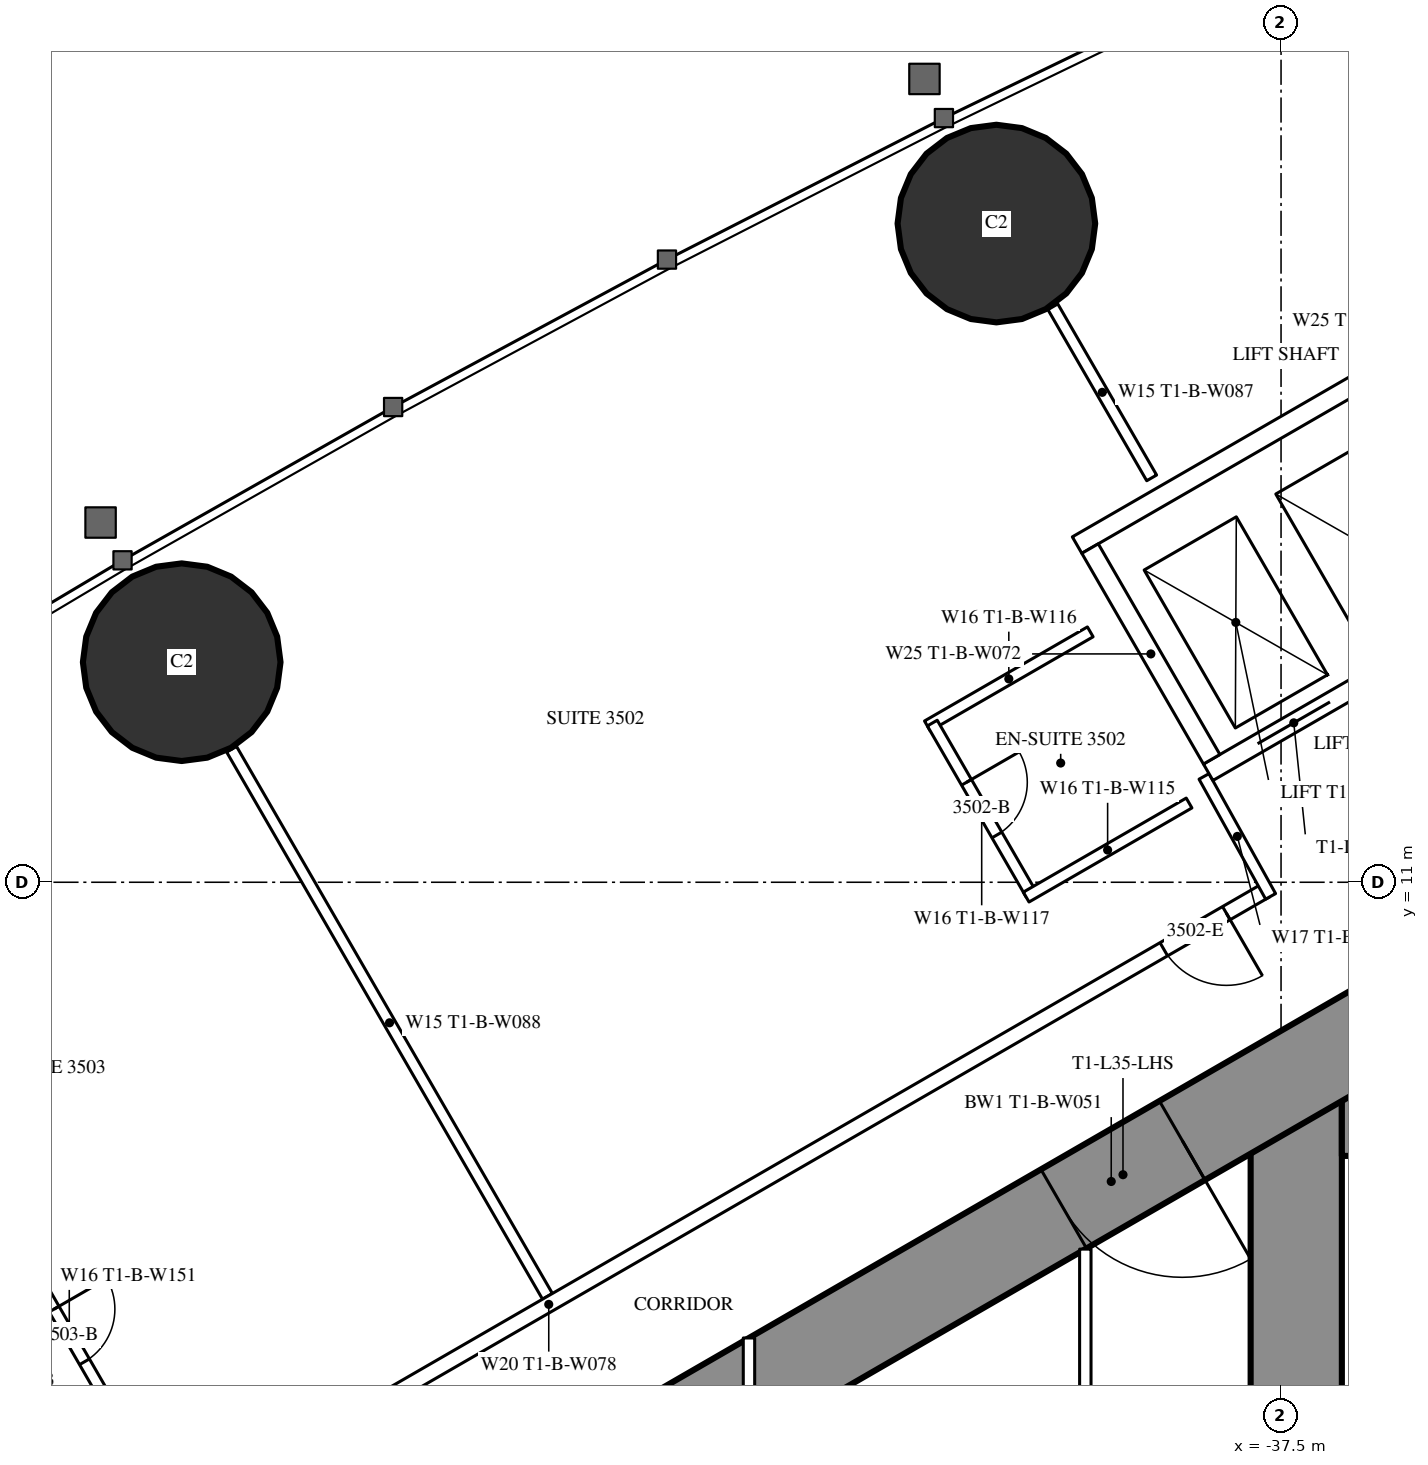
"""IFC4 building model, lengths in metres.
Left out: names, types, materials, properties, quantities, classifications, styles, units other than length and angle.
Written with IfcOpenShell. Run it as: python <this file> out.ifc"""

import sys

from ifc_helpers import new_model, si_unit, direction, frame, frame_2d, origin, origin_2d, place, context, subcontext, project, spatial, rectangle, hollow_circle, extrude, element, fill, save


model = new_model("IFC4")
c1 = context("Model", 3, precision=1e-05, world=origin(), true_north=direction((0.0, 1.0)))
c2 = subcontext(c1, "Body", "Model", "MODEL_VIEW")
j1 = project(units=[si_unit("LENGTHUNIT", "METRE"), si_unit("PLANEANGLEUNIT", "RADIAN")], contexts=[c1])
p1 = place(None, origin())
s1 = spatial("IfcSite", under=j1, at=p1, CompositionType="ELEMENT")
p2 = place(p1, origin())
s2 = spatial("IfcBuilding", under=s1, at=p2, CompositionType="ELEMENT")
p3 = place(p2, frame((0.0, 0.0, 132.6)))
s3 = spatial("IfcBuildingStorey", under=s2, at=p3, CompositionType="ELEMENT", Elevation=132.6)
for number, where, z_axis, x_axis in (
    (1, (-41.245, 19.666, 0.0), (0.0, 0.0, 1.0), (1.0, 0.0, 0.0)),
    (2, (-51.963, 13.895, 0.0), (0.0, 0.0, 1.0), (1.0, 0.0, 0.0)),
):
    element("IfcColumn", number, at=place(p3, frame(where, z_axis=z_axis, x_axis=x_axis)), inside=s3, PredefinedType="COLUMN", context=c2, shape_type="SweptSolid", body=[
        extrude(hollow_circle(Radius=1.3, WallThickness=0.1, at=origin_2d()), origin(), (0.0, 0.0, 1.0), 3.5),
    ])
p4 = place(p3, frame((-37.3, 8.6, 0.0), z_axis=(0.0, 0.0, 1.0), x_axis=(0.0, -1.0, 0.0)))
e3 = element("IfcWall", 3, at=p4, inside=s3, PredefinedType="SHEAR", context=c2, shape_type="SweptSolid", body=[
    extrude(rectangle(XDim=17.2, YDim=1.2, at=frame_2d((8.6, 0.0))), origin(), (0.0, 0.0, 1.0), 3.5),
])
p5 = place(p4, frame((7.7, 0.0, 0.0)))
e4 = element("IfcOpeningElement", 4, at=p5, cuts=e3, PredefinedType="OPENING", context=c2, shape_type="SweptSolid", body=[
    extrude(rectangle(XDim=1.8, YDim=2.2, at=frame_2d((0.9, 1.1))), frame((0.0, 0.61, 0.0), z_axis=(0.0, -1.0, 0.0), x_axis=(1.0, 0.0, 0.0)), (0.0, 0.0, 1.0), 1.22),
])
p6 = place(p3, frame((-28.3, 8.0, 0.0), z_axis=(0.0, 0.0, 1.0), x_axis=(-1.0, 0.0, 0.0)))
e5 = element("IfcWall", 5, at=p6, inside=s3, PredefinedType="SHEAR", context=c2, shape_type="SweptSolid", body=[
    extrude(rectangle(XDim=8.4, YDim=1.2, at=frame_2d((4.2, 0.0))), origin(), (0.0, 0.0, 1.0), 3.5),
])
p7 = place(p6, frame((0.25, 0.0, 0.0)))
e6 = element("IfcOpeningElement", 6, at=p7, cuts=e5, PredefinedType="OPENING", context=c2, shape_type="SweptSolid", body=[
    extrude(rectangle(XDim=1.0, YDim=2.2, at=frame_2d((0.5, 1.1))), frame((0.0, 0.61, 0.0), z_axis=(0.0, -1.0, 0.0), x_axis=(1.0, 0.0, 0.0)), (0.0, 0.0, 1.0), 1.22),
])
p8 = place(p3, frame((-27.2, 14.3, 0.0), z_axis=(0.0, 0.0, 1.0), x_axis=(-0.866026593062, -0.499997940104, 0.0)))
e7 = element("IfcWall", 7, at=p8, inside=s3, PredefinedType="SHEAR", context=c2, shape_type="SweptSolid", body=[
    extrude(rectangle(XDim=28.946, YDim=1.2, at=frame_2d((14.473, 0.0))), origin(), (0.0, 0.0, 1.0), 3.5),
])
p9 = place(p8, frame((4.6, 0.0, 0.0)))
e8 = element("IfcOpeningElement", 8, at=p9, cuts=e7, PredefinedType="OPENING", context=c2, shape_type="SweptSolid", body=[
    extrude(rectangle(XDim=1.0, YDim=2.2, at=frame_2d((0.5, 1.1))), frame((0.0, 0.61, 0.0), z_axis=(0.0, -1.0, 0.0), x_axis=(1.0, 0.0, 0.0)), (0.0, 0.0, 1.0), 1.22),
])
p10 = place(p8, frame((13.395, 0.0, 0.0)))
e9 = element("IfcOpeningElement", 9, at=p10, cuts=e7, PredefinedType="OPENING", context=c2, shape_type="SweptSolid", body=[
    extrude(rectangle(XDim=1.8, YDim=2.2, at=frame_2d((0.9, 1.1))), frame((0.0, 0.61, 0.0), z_axis=(0.0, -1.0, 0.0), x_axis=(1.0, 0.0, 0.0)), (0.0, 0.0, 1.0), 1.22),
])
p11 = place(p3, frame((-47.151, 5.552, 0.0), z_axis=(0.0, 0.0, 1.0), x_axis=(-0.500003012045, 0.866023664773, 0.0)))
e10 = element("IfcWall", 10, at=p11, inside=s3, PredefinedType="PARTITIONING", context=c2, shape_type="SweptSolid", body=[
    extrude(rectangle(XDim=8.311, YDim=0.15, at=frame_2d((4.156, 0.0))), origin(), (0.0, 0.0, 1.0), 2.2),
])
p12 = place(p3, frame((-39.202, 16.32, 0.0), z_axis=(0.0, 0.0, 1.0), x_axis=(-0.499947391036, 0.866055775454, 0.0)))
e11 = element("IfcWall", 11, at=p12, inside=s3, PredefinedType="PARTITIONING", context=c2, shape_type="SweptSolid", body=[
    extrude(rectangle(XDim=2.599, YDim=0.15, at=frame_2d((1.3, 0.0))), origin(), (0.0, 0.0, 1.0), 3.25),
])
p13 = place(p3, frame((-37.7, 10.894, 0.0), z_axis=(0.0, 0.0, 1.0), x_axis=(-0.866027905338, -0.499995667157, 0.0)))
e12 = element("IfcWall", 12, at=p13, inside=s3, PredefinedType="PARTITIONING", context=c2, shape_type="SweptSolid", body=[
    extrude(rectangle(XDim=21.787, YDim=0.2, at=frame_2d((10.894, 0.0))), origin(), (0.0, 0.0, 1.0), 3.25),
])
p14 = place(p13, frame((17.711, 0.0, 0.0)))
e13 = element("IfcOpeningElement", 13, at=p14, cuts=e12, PredefinedType="OPENING", context=c2, shape_type="SweptSolid", body=[
    extrude(rectangle(XDim=0.95, YDim=2.2, at=frame_2d((0.475, 1.1))), frame((0.0, 0.11, 0.0), z_axis=(0.0, -1.0, 0.0), x_axis=(1.0, 0.0, 0.0)), (0.0, 0.0, 1.0), 0.22),
])
p15 = place(p13, frame((19.399, 0.0, 0.0)))
e14 = element("IfcOpeningElement", 14, at=p15, cuts=e12, PredefinedType="OPENING", context=c2, shape_type="SweptSolid", body=[
    extrude(rectangle(XDim=1.8, YDim=2.2, at=frame_2d((0.9, 1.1))), frame((0.0, 0.11, 0.0), z_axis=(0.0, -1.0, 0.0), x_axis=(1.0, 0.0, 0.0)), (0.0, 0.0, 1.0), 0.22),
])
p16 = place(p13, frame((0.6, 0.0, 0.0)))
e15 = element("IfcOpeningElement", 15, at=p16, cuts=e12, PredefinedType="OPENING", context=c2, shape_type="SweptSolid", body=[
    extrude(rectangle(XDim=0.95, YDim=2.2, at=frame_2d((0.475, 1.1))), frame((0.0, 0.11, 0.0), z_axis=(0.0, -1.0, 0.0), x_axis=(1.0, 0.0, 0.0)), (0.0, 0.0, 1.0), 0.22),
])
p17 = place(p3, frame((-38.513, 12.392, 0.0), z_axis=(0.0, 0.0, 1.0), x_axis=(0.485585508183, -0.874189175317, 0.0)))
e16 = element("IfcWall", 16, at=p17, inside=s3, PredefinedType="PARTITIONING", context=c2, shape_type="SweptSolid", body=[
    extrude(rectangle(XDim=1.805, YDim=0.15, at=frame_2d((0.902, 0.0))), origin(), (0.0, 0.0, 1.0), 3.25),
])
p18 = place(p3, frame((-52.792, 3.912, 0.0), z_axis=(0.0, 0.0, 1.0), x_axis=(-0.500006934395, 0.866021400173, 0.0)))
e17 = element("IfcWall", 17, at=p18, inside=s3, PredefinedType="PARTITIONING", context=c2, shape_type="SweptSolid", body=[
    extrude(rectangle(XDim=2.6, YDim=0.15, at=frame_2d((1.3, 0.0))), origin(), (0.0, 0.0, 1.0), 3.25),
])
p19 = place(p18, frame((0.9, 0.0, 0.0)))
e18 = element("IfcOpeningElement", 18, at=p19, cuts=e17, PredefinedType="OPENING", context=c2, shape_type="SweptSolid", body=[
    extrude(rectangle(XDim=0.8, YDim=2.2, at=frame_2d((0.4, 1.1))), frame((0.0, 0.085, 0.0), z_axis=(0.0, -1.0, 0.0), x_axis=(1.0, 0.0, 0.0)), (0.0, 0.0, 1.0), 0.17),
])
p20 = place(p3, frame((-40.01, 14.294, 0.0), z_axis=(0.0, 0.0, 1.0), x_axis=(-0.866031185235, -0.4999899861, 0.0)))
e19 = element("IfcWall", 19, at=p20, inside=s3, PredefinedType="PARTITIONING", context=c2, shape_type="SweptSolid", body=[
    extrude(rectangle(XDim=2.475, YDim=0.15, at=frame_2d((1.238, 0.0))), origin(), (0.0, 0.0, 1.0), 3.25),
])
p21 = place(p3, frame((-40.788, 10.843, 0.0), z_axis=(0.0, 0.0, 1.0), x_axis=(-0.500006934395, 0.866021400173, 0.0)))
e20 = element("IfcWall", 20, at=p21, inside=s3, PredefinedType="PARTITIONING", context=c2, shape_type="SweptSolid", body=[
    extrude(rectangle(XDim=2.6, YDim=0.15, at=frame_2d((1.3, 0.0))), origin(), (0.0, 0.0, 1.0), 3.25),
])
p22 = place(p21, frame((0.9, 0.0, 0.0)))
e21 = element("IfcOpeningElement", 21, at=p22, cuts=e20, PredefinedType="OPENING", context=c2, shape_type="SweptSolid", body=[
    extrude(rectangle(XDim=0.8, YDim=2.2, at=frame_2d((0.4, 1.1))), frame((0.0, 0.085, 0.0), z_axis=(0.0, -1.0, 0.0), x_axis=(1.0, 0.0, 0.0)), (0.0, 0.0, 1.0), 0.17),
])
p23 = place(p3, frame((-38.71, 12.042, 0.0), z_axis=(0.0, 0.0, 1.0), x_axis=(-0.86604923931, -0.499958713387, 0.0)))
e22 = element("IfcWall", 22, at=p23, inside=s3, PredefinedType="PARTITIONING", context=c2, shape_type="SweptSolid", body=[
    extrude(rectangle(XDim=2.475, YDim=0.15, at=frame_2d((1.237, 0.0))), origin(), (0.0, 0.0, 1.0), 3.25),
])
p24 = place(p3, frame((-40.075, 6.174, 0.0), z_axis=(0.0, 0.0, 1.0), x_axis=(0.0, -1.0, 0.0)))
e23 = element("IfcWall", 23, at=p24, inside=s3, PredefinedType="PARTITIONING", context=c2, shape_type="SweptSolid", body=[
    extrude(rectangle(XDim=7.374, YDim=0.15, at=frame_2d((3.687, 0.0))), origin(), (0.0, 0.0, 1.0), 3.25),
])
p25 = place(p24, frame((2.787, 0.0, 0.0)))
e24 = element("IfcOpeningElement", 24, at=p25, cuts=e23, PredefinedType="OPENING", context=c2, shape_type="SweptSolid", body=[
    extrude(rectangle(XDim=1.8, YDim=2.2, at=frame_2d((0.9, 1.1))), frame((0.0, 0.085, 0.0), z_axis=(0.0, -1.0, 0.0), x_axis=(1.0, 0.0, 0.0)), (0.0, 0.0, 1.0), 0.17),
])
p26 = place(p3, frame((-44.5, 5.005, 0.0), z_axis=(0.0, 0.0, 1.0), x_axis=(0.0, -1.0, 0.0)))
e25 = element("IfcWall", 25, at=p26, inside=s3, PredefinedType="PARTITIONING", context=c2, shape_type="SweptSolid", body=[
    extrude(rectangle(XDim=10.009, YDim=0.15, at=frame_2d((5.005, 0.0))), origin(), (0.0, 0.0, 1.0), 2.45),
])
p27 = place(p26, frame((4.505, 0.0, 0.0)))
e26 = element("IfcOpeningElement", 26, at=p27, cuts=e25, PredefinedType="OPENING", context=c2, shape_type="SweptSolid", body=[
    extrude(rectangle(XDim=1.0, YDim=2.2, at=frame_2d((0.5, 1.1))), frame((0.0, 0.085, 0.0), z_axis=(0.0, -1.0, 0.0), x_axis=(1.0, 0.0, 0.0)), (0.0, 0.0, 1.0), 0.17),
])
p28 = place(p3, frame((-31.01, 16.747, 0.0), z_axis=(0.0, 0.0, 1.0), x_axis=(-0.866028165386, -0.499995216735, 0.0)))
e27 = element("IfcWall", 27, at=p28, inside=s3, PredefinedType="PARTITIONING", context=c2, shape_type="SweptSolid", body=[
    extrude(rectangle(XDim=8.6, YDim=0.25, at=frame_2d((4.3, 0.0))), origin(), (0.0, 0.0, 1.0), 3.25),
])
p29 = place(p28, frame((0.75, 0.0, 0.0)))
e28 = element("IfcOpeningElement", 28, at=p29, cuts=e27, PredefinedType="OPENING", context=c2, shape_type="SweptSolid", body=[
    extrude(rectangle(XDim=1.1, YDim=2.2, at=frame_2d((0.55, 1.1))), frame((0.0, 0.135, 0.0), z_axis=(0.0, -1.0, 0.0), x_axis=(1.0, 0.0, 0.0)), (0.0, 0.0, 1.0), 0.27),
])
p30 = place(p28, frame((2.75, 0.0, 0.0)))
e29 = element("IfcOpeningElement", 29, at=p30, cuts=e27, PredefinedType="OPENING", context=c2, shape_type="SweptSolid", body=[
    extrude(rectangle(XDim=1.1, YDim=2.2, at=frame_2d((0.55, 1.1))), frame((0.0, 0.135, 0.0), z_axis=(0.0, -1.0, 0.0), x_axis=(1.0, 0.0, 0.0)), (0.0, 0.0, 1.0), 0.27),
])
p31 = place(p28, frame((4.75, 0.0, 0.0)))
e30 = element("IfcOpeningElement", 30, at=p31, cuts=e27, PredefinedType="OPENING", context=c2, shape_type="SweptSolid", body=[
    extrude(rectangle(XDim=1.1, YDim=2.2, at=frame_2d((0.55, 1.1))), frame((0.0, 0.135, 0.0), z_axis=(0.0, -1.0, 0.0), x_axis=(1.0, 0.0, 0.0)), (0.0, 0.0, 1.0), 0.27),
])
p32 = place(p28, frame((6.75, 0.0, 0.0)))
e31 = element("IfcOpeningElement", 31, at=p32, cuts=e27, PredefinedType="OPENING", context=c2, shape_type="SweptSolid", body=[
    extrude(rectangle(XDim=1.1, YDim=2.2, at=frame_2d((0.55, 1.1))), frame((0.0, 0.135, 0.0), z_axis=(0.0, -1.0, 0.0), x_axis=(1.0, 0.0, 0.0)), (0.0, 0.0, 1.0), 0.27),
])
p33 = place(p3, frame((-32.736, 19.736, 0.0), z_axis=(0.0, 0.0, 1.0), x_axis=(-0.866028165386, -0.499995216735, 0.0)))
e32 = element("IfcWall", 32, at=p33, inside=s3, PredefinedType="PARTITIONING", context=c2, shape_type="SweptSolid", body=[
    extrude(rectangle(XDim=8.6, YDim=0.25, at=frame_2d((4.3, 0.0))), origin(), (0.0, 0.0, 1.0), 3.25),
])
p34 = place(p3, frame((-38.413, 12.618, 0.0), z_axis=(0.0, 0.0, 1.0), x_axis=(-0.499872130319, 0.866099216793, 0.0)))
e33 = element("IfcWall", 33, at=p34, inside=s3, PredefinedType="PARTITIONING", context=c2, shape_type="SweptSolid", body=[
    extrude(rectangle(XDim=3.2, YDim=0.25, at=frame_2d((1.6, 0.0))), origin(), (0.0, 0.0, 1.0), 3.25),
])
p35 = place(p19, origin())
e34 = element("IfcDoor", 34, at=p35, inside=s3, OperationType="SINGLE_SWING_RIGHT", PredefinedType="DOOR", context=c2, shape_type="SweptSolid", body=[
    extrude(rectangle(XDim=0.8, YDim=2.2, at=frame_2d((0.4, 1.1))), frame((0.0, 0.025, 0.0), z_axis=(0.0, -1.0, 0.0), x_axis=(1.0, 0.0, 0.0)), (0.0, 0.0, 1.0), 0.05),
])
fill(e18, e34)
p36 = place(p22, origin())
e35 = element("IfcDoor", 35, at=p36, inside=s3, OperationType="SINGLE_SWING_RIGHT", PredefinedType="DOOR", context=c2, shape_type="SweptSolid", body=[
    extrude(rectangle(XDim=0.8, YDim=2.2, at=frame_2d((0.4, 1.1))), frame((0.0, 0.025, 0.0), z_axis=(0.0, -1.0, 0.0), x_axis=(1.0, 0.0, 0.0)), (0.0, 0.0, 1.0), 0.05),
])
fill(e21, e35)
p37 = place(p16, origin())
e36 = element("IfcDoor", 36, at=p37, inside=s3, OperationType="SINGLE_SWING_LEFT", PredefinedType="DOOR", context=c2, shape_type="SweptSolid", body=[
    extrude(rectangle(XDim=0.95, YDim=2.2, at=frame_2d((0.475, 1.1))), frame((0.0, 0.025, 0.0), z_axis=(0.0, -1.0, 0.0), x_axis=(1.0, 0.0, 0.0)), (0.0, 0.0, 1.0), 0.05),
])
fill(e15, e36)
p38 = place(p10, origin())
e37 = element("IfcDoor", 37, at=p38, inside=s3, OperationType="DOUBLE_DOOR_SINGLE_SWING", PredefinedType="DOOR", context=c2, shape_type="SweptSolid", body=[
    extrude(rectangle(XDim=1.8, YDim=2.2, at=frame_2d((0.9, 1.1))), frame((0.0, 0.025, 0.0), z_axis=(0.0, -1.0, 0.0), x_axis=(1.0, 0.0, 0.0)), (0.0, 0.0, 1.0), 0.05),
])
fill(e9, e37)
p39 = place(p32, origin())
e38 = element("IfcDoor", 38, at=p39, inside=s3, OperationType="DOUBLE_DOOR_SLIDING", PredefinedType="USERDEFINED", context=c2, shape_type="SweptSolid", body=[
    extrude(rectangle(XDim=1.1, YDim=2.2, at=frame_2d((0.55, 1.1))), frame((0.0, 0.025, 0.0), z_axis=(0.0, -1.0, 0.0), x_axis=(1.0, 0.0, 0.0)), (0.0, 0.0, 1.0), 0.05),
])
fill(e31, e38)
save(model, sys.argv[1])
